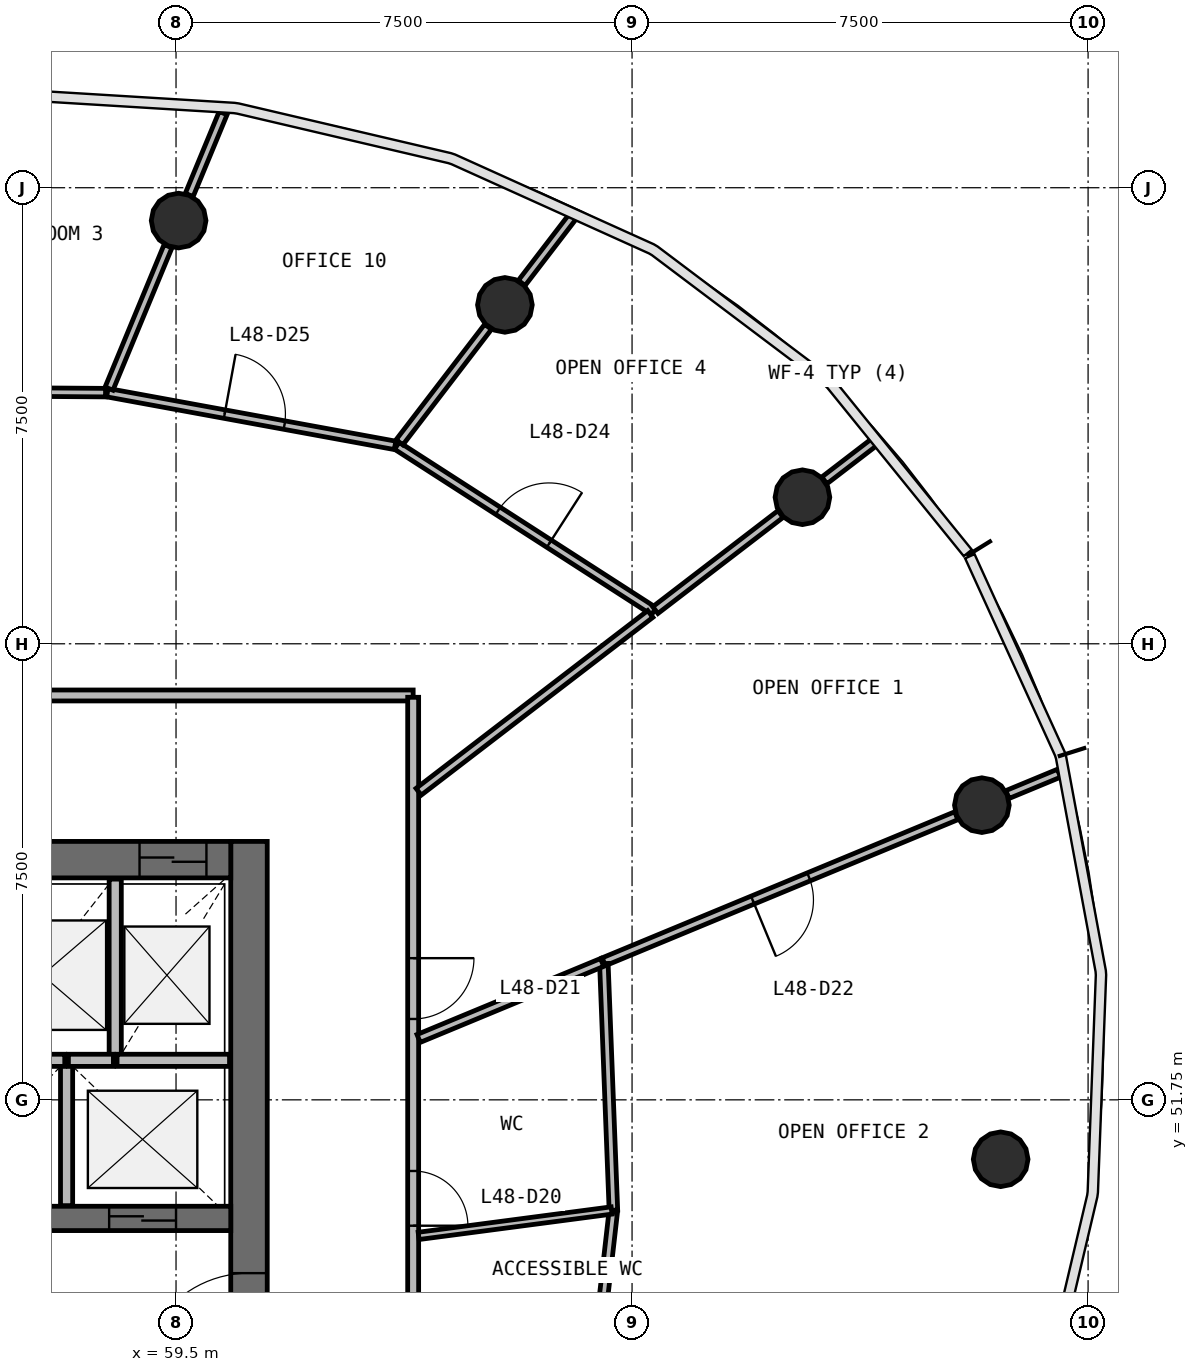
"""IFC4 building model, lengths in metres.
Left out: names, types, materials, properties, quantities, classifications, styles, units other than length and angle.
Written with IfcOpenShell. Run it as: python <this file> out.ifc"""

import sys

from ifc_helpers import new_model, si_unit, direction, frame, frame_2d, origin, origin_2d, place, context, subcontext, project, spatial, rectangle, circle, extrude, source, transform, mapped, element, fill, save


model = new_model("IFC4")
c1 = context("Model", 3, precision=1e-05, world=origin(), true_north=direction((0.0, 1.0)))
c2 = subcontext(c1, "Body", "Model", "MODEL_VIEW")
j1 = project(units=[si_unit("LENGTHUNIT", "METRE"), si_unit("PLANEANGLEUNIT", "RADIAN")], contexts=[c1])
p1 = place(None, origin())
s1 = spatial("IfcSite", under=j1, at=p1, CompositionType="ELEMENT")
p2 = place(p1, origin())
s2 = spatial("IfcBuilding", under=s1, at=p2, CompositionType="ELEMENT")
p3 = place(p2, frame((0.0, 0.0, 199.4)))
s3 = spatial("IfcBuildingStorey", under=s2, at=p3, CompositionType="ELEMENT", Elevation=199.4)
p4 = place(p3, frame((60.7, 40.0, 0.0), z_axis=(0.0, 0.0, 1.0), x_axis=(0.0, 1.0, 0.0)))
e1 = element("IfcWall", 1, at=p4, inside=s3, PredefinedType="SHEAR", context=c2, shape_type="SweptSolid", body=[
    extrude(rectangle(XDim=16.0, YDim=0.6, at=frame_2d((8.0, 0.0))), origin(), (0.0, 0.0, 1.0), 3.9),
])
p5 = place(p4, frame((7.1, 0.0, 0.0)))
e2 = element("IfcOpeningElement", 2, at=p5, cuts=e1, PredefinedType="OPENING", context=c2, shape_type="SweptSolid", body=[
    extrude(rectangle(XDim=1.8, YDim=2.1, at=frame_2d((0.9, 1.05))), frame((0.0, 0.31, 0.0), z_axis=(0.0, -1.0, 0.0), x_axis=(1.0, 0.0, 0.0)), (0.0, 0.0, 1.0), 0.62),
])
p6 = place(p3, frame((60.4, 55.7, 0.0), z_axis=(0.0, 0.0, 1.0), x_axis=(-1.0, 0.0, 0.0)))
e3 = element("IfcWall", 3, at=p6, inside=s3, PredefinedType="SHEAR", context=c2, shape_type="SweptSolid", body=[
    extrude(rectangle(XDim=16.8, YDim=0.6, at=frame_2d((8.4, 0.0))), origin(), (0.0, 0.0, 1.0), 3.9),
])
p7 = place(p6, frame((0.4, 0.0, 0.0)))
e4 = element("IfcOpeningElement", 4, at=p7, cuts=e3, PredefinedType="OPENING", context=c2, shape_type="SweptSolid", body=[
    extrude(rectangle(XDim=1.1, YDim=2.1, at=frame_2d((0.55, 1.05))), frame((0.0, 0.31, 0.0), z_axis=(0.0, -1.0, 0.0), x_axis=(1.0, 0.0, 0.0)), (0.0, 0.0, 1.0), 0.62),
])
p8 = place(p6, frame((10.3, 0.0, 0.0)))
e5 = element("IfcOpeningElement", 5, at=p8, cuts=e3, PredefinedType="OPENING", context=c2, shape_type="SweptSolid", body=[
    extrude(rectangle(XDim=1.2, YDim=2.1, at=frame_2d((0.6, 1.05))), frame((0.0, 0.31, 0.0), z_axis=(0.0, -1.0, 0.0), x_axis=(1.0, 0.0, 0.0)), (0.0, 0.0, 1.0), 0.62),
])
p9 = place(p6, frame((7.25, 0.0, 0.0)))
e6 = element("IfcOpeningElement", 6, at=p9, cuts=e3, PredefinedType="OPENING", context=c2, shape_type="SweptSolid", body=[
    extrude(rectangle(XDim=1.1, YDim=2.1, at=frame_2d((0.55, 1.05))), frame((0.0, 0.31, 0.0), z_axis=(0.0, -1.0, 0.0), x_axis=(1.0, 0.0, 0.0)), (0.0, 0.0, 1.0), 0.62),
])
p10 = place(p3, frame((43.6, 49.8, 0.0), z_axis=(0.0, 0.0, 1.0), x_axis=(1.0, 0.0, 0.0)))
e7 = element("IfcWall", 7, at=p10, inside=s3, PredefinedType="SHEAR", context=c2, shape_type="SweptSolid", body=[
    extrude(rectangle(XDim=16.8, YDim=0.4, at=frame_2d((8.4, 0.0))), origin(), (0.0, 0.0, 1.0), 3.9),
])
p11 = place(p10, frame((9.8, 0.0, 0.0)))
e8 = element("IfcOpeningElement", 8, at=p11, cuts=e7, PredefinedType="OPENING", context=c2, shape_type="SweptSolid", body=[
    extrude(rectangle(XDim=1.1, YDim=2.1, at=frame_2d((0.55, 1.05))), frame((0.0, 0.21, 0.0), z_axis=(0.0, -1.0, 0.0), x_axis=(1.0, 0.0, 0.0)), (0.0, 0.0, 1.0), 0.42),
])
p12 = place(p10, frame((12.3, 0.0, 0.0)))
e9 = element("IfcOpeningElement", 9, at=p12, cuts=e7, PredefinedType="OPENING", context=c2, shape_type="SweptSolid", body=[
    extrude(rectangle(XDim=1.1, YDim=2.1, at=frame_2d((0.55, 1.05))), frame((0.0, 0.21, 0.0), z_axis=(0.0, -1.0, 0.0), x_axis=(1.0, 0.0, 0.0)), (0.0, 0.0, 1.0), 0.42),
])
p13 = place(p10, frame((14.8, 0.0, 0.0)))
e10 = element("IfcOpeningElement", 10, at=p13, cuts=e7, PredefinedType="OPENING", context=c2, shape_type="SweptSolid", body=[
    extrude(rectangle(XDim=1.1, YDim=2.1, at=frame_2d((0.55, 1.05))), frame((0.0, 0.21, 0.0), z_axis=(0.0, -1.0, 0.0), x_axis=(1.0, 0.0, 0.0)), (0.0, 0.0, 1.0), 0.42),
])
p14 = place(p10, frame((4.45, 0.0, 0.0)))
e11 = element("IfcOpeningElement", 11, at=p14, cuts=e7, PredefinedType="OPENING", context=c2, shape_type="SweptSolid", body=[
    extrude(rectangle(XDim=0.9, YDim=2.1, at=frame_2d((0.45, 1.05))), frame((0.0, 0.21, 0.0), z_axis=(0.0, -1.0, 0.0), x_axis=(1.0, 0.0, 0.0)), (0.0, 0.0, 1.0), 0.42),
])
p15 = place(p10, frame((7.85, 0.0, 0.0)))
e12 = element("IfcOpeningElement", 12, at=p15, cuts=e7, PredefinedType="OPENING", context=c2, shape_type="SweptSolid", body=[
    extrude(rectangle(XDim=0.9, YDim=2.1, at=frame_2d((0.45, 1.05))), frame((0.0, 0.21, 0.0), z_axis=(0.0, -1.0, 0.0), x_axis=(1.0, 0.0, 0.0)), (0.0, 0.0, 1.0), 0.42),
])
m1 = source(origin(), c2, "Body", "SweptSolid", [
    extrude(circle(Radius=0.45, at=origin_2d()), origin(), (0.0, 0.0, 1.0), 3.9),
])
for number, where, z_axis, x_axis in (
    (13, (73.062, 50.773, 0.0), (0.0, 0.0, 1.0), (1.0, 0.0, 0.0)),
    (14, (72.753, 56.596, 0.0), (0.0, 0.0, 1.0), (1.0, 0.0, 0.0)),
    (15, (69.802, 61.66, 0.0), (0.0, 0.0, 1.0), (1.0, 0.0, 0.0)),
    (16, (64.909, 64.823, 0.0), (0.0, 0.0, 1.0), (1.0, 0.0, 0.0)),
    (17, (59.543, 66.21, 0.0), (0.0, 0.0, 1.0), (1.0, 0.0, 0.0)),
):
    element("IfcColumn", number, at=place(p3, frame(where, z_axis=z_axis, x_axis=x_axis)), inside=s3, PredefinedType="COLUMN", context=c2, shape_type="MappedRepresentation", body=[
        mapped(m1, transform((0.0, 0.0, 0.0), scale=1.0)),
    ])
p16 = place(p3, frame((58.5, 52.4, 0.0), z_axis=(0.0, 0.0, 1.0), x_axis=(0.0, 1.0, 0.0)))
e18 = element("IfcWall", 18, at=p16, inside=s3, PredefinedType="SOLIDWALL", context=c2, shape_type="SweptSolid", body=[
    extrude(rectangle(XDim=2.98, YDim=0.2, at=frame_2d((1.49, 0.0))), origin(), (0.0, 0.0, 1.0), 3.58),
])
p17 = place(p3, frame((57.7, 50.01, 0.0), z_axis=(0.0, 0.0, 1.0), x_axis=(0.0, 1.0, 0.0)))
e19 = element("IfcWall", 19, at=p17, inside=s3, PredefinedType="SOLIDWALL", context=c2, shape_type="SweptSolid", body=[
    extrude(rectangle(XDim=2.39, YDim=0.2, at=frame_2d((1.195, 0.0))), origin(), (0.0, 0.0, 1.0), 3.58),
])
p18 = place(p3, frame((60.38, 52.4, 0.0), z_axis=(0.0, 0.0, 1.0), x_axis=(-1.0, 0.0, 0.0)))
e20 = element("IfcWall", 20, at=p18, inside=s3, PredefinedType="SOLIDWALL", context=c2, shape_type="SweptSolid", body=[
    extrude(rectangle(XDim=1.85, YDim=0.2, at=frame_2d((0.925, 0.0))), origin(), (0.0, 0.0, 1.0), 3.58),
])
p19 = place(p3, frame((57.67, 52.4, 0.0), z_axis=(0.0, 0.0, 1.0), x_axis=(-1.0, 0.0, 0.0)))
e21 = element("IfcWall", 21, at=p19, inside=s3, PredefinedType="SOLIDWALL", context=c2, shape_type="SweptSolid", body=[
    extrude(rectangle(XDim=1.54, YDim=0.2, at=frame_2d((0.77, 0.0))), origin(), (0.0, 0.0, 1.0), 3.58),
])
p20 = place(p3, frame((58.47, 52.4, 0.0), z_axis=(0.0, 0.0, 1.0), x_axis=(-1.0, 0.0, 0.0)))
e22 = element("IfcWall", 22, at=p20, inside=s3, PredefinedType="SOLIDWALL", context=c2, shape_type="SweptSolid", body=[
    extrude(rectangle(XDim=0.74, YDim=0.2, at=frame_2d((0.37, 0.0))), origin(), (0.0, 0.0, 1.0), 3.58),
])
p21 = place(p3, frame((40.6, 58.4, 0.0), z_axis=(0.0, 0.0, 1.0), x_axis=(1.0, 0.0, 0.0)))
e23 = element("IfcWall", 23, at=p21, inside=s3, PredefinedType="PARTITIONING", context=c2, shape_type="SweptSolid", body=[
    extrude(rectangle(XDim=22.8, YDim=0.18, at=frame_2d((11.4, 0.0))), origin(), (0.0, 0.0, 1.0), 2.88),
])
p22 = place(p21, frame((10.95, 0.0, 0.0)))
e24 = element("IfcOpeningElement", 24, at=p22, cuts=e23, PredefinedType="OPENING", context=c2, shape_type="SweptSolid", body=[
    extrude(rectangle(XDim=1.0, YDim=2.1, at=frame_2d((0.5, 1.05))), frame((0.0, 0.1, 0.0), z_axis=(0.0, -1.0, 0.0), x_axis=(1.0, 0.0, 0.0)), (0.0, 0.0, 1.0), 0.2),
])
p23 = place(p21, frame((8.75, 0.0, 0.0)))
e25 = element("IfcOpeningElement", 25, at=p23, cuts=e23, PredefinedType="OPENING", context=c2, shape_type="SweptSolid", body=[
    extrude(rectangle(XDim=1.0, YDim=2.1, at=frame_2d((0.5, 1.05))), frame((0.0, 0.1, 0.0), z_axis=(0.0, -1.0, 0.0), x_axis=(1.0, 0.0, 0.0)), (0.0, 0.0, 1.0), 0.2),
])
p24 = place(p3, frame((63.4, 58.37, 0.0), z_axis=(0.0, 0.0, 1.0), x_axis=(0.0, -1.0, 0.0)))
e26 = element("IfcWall", 26, at=p24, inside=s3, PredefinedType="PARTITIONING", context=c2, shape_type="SweptSolid", body=[
    extrude(rectangle(XDim=20.74, YDim=0.18, at=frame_2d((10.37, 0.0))), origin(), (0.0, 0.0, 1.0), 2.88),
])
p25 = place(p24, frame((9.99, 0.0, 0.0)))
e27 = element("IfcOpeningElement", 27, at=p25, cuts=e26, PredefinedType="OPENING", context=c2, shape_type="SweptSolid", body=[
    extrude(rectangle(XDim=0.9, YDim=2.1, at=frame_2d((0.45, 1.05))), frame((0.0, 0.1, 0.0), z_axis=(0.0, -1.0, 0.0), x_axis=(1.0, 0.0, 0.0)), (0.0, 0.0, 1.0), 0.2),
])
p26 = place(p24, frame((7.79, 0.0, 0.0)))
e28 = element("IfcOpeningElement", 28, at=p26, cuts=e26, PredefinedType="OPENING", context=c2, shape_type="SweptSolid", body=[
    extrude(rectangle(XDim=0.9, YDim=2.1, at=frame_2d((0.45, 1.05))), frame((0.0, 0.1, 0.0), z_axis=(0.0, -1.0, 0.0), x_axis=(1.0, 0.0, 0.0)), (0.0, 0.0, 1.0), 0.2),
])
p27 = place(p24, frame((4.29, 0.0, 0.0)))
e29 = element("IfcOpeningElement", 29, at=p27, cuts=e26, PredefinedType="OPENING", context=c2, shape_type="SweptSolid", body=[
    extrude(rectangle(XDim=1.0, YDim=2.1, at=frame_2d((0.5, 1.05))), frame((0.0, 0.1, 0.0), z_axis=(0.0, -1.0, 0.0), x_axis=(1.0, 0.0, 0.0)), (0.0, 0.0, 1.0), 0.2),
])
p28 = place(p24, frame((12.09, 0.0, 0.0)))
e30 = element("IfcOpeningElement", 30, at=p28, cuts=e26, PredefinedType="OPENING", context=c2, shape_type="SweptSolid", body=[
    extrude(rectangle(XDim=1.0, YDim=2.1, at=frame_2d((0.5, 1.05))), frame((0.0, 0.1, 0.0), z_axis=(0.0, -1.0, 0.0), x_axis=(1.0, 0.0, 0.0)), (0.0, 0.0, 1.0), 0.2),
])
p29 = place(p3, frame((72.333, 56.422, 0.0), z_axis=(0.0, 0.0, 1.0), x_axis=(-0.92388406428, -0.382672491525, 0.0)))
e31 = element("IfcWall", 31, at=p29, inside=s3, PredefinedType="PARTITIONING", context=c2, shape_type="SweptSolid", body=[
    extrude(rectangle(XDim=6.275, YDim=0.14, at=frame_2d((3.138, 0.0))), origin(), (0.0, 0.0, 1.0), 2.88),
])
p30 = place(p29, frame((2.625, 0.0, 0.0)))
e32 = element("IfcOpeningElement", 32, at=p30, cuts=e31, PredefinedType="OPENING", context=c2, shape_type="SweptSolid", body=[
    extrude(rectangle(XDim=1.0, YDim=2.1, at=frame_2d((0.5, 1.05))), frame((0.0, 0.08, 0.0), z_axis=(0.0, -1.0, 0.0), x_axis=(1.0, 0.0, 0.0)), (0.0, 0.0, 1.0), 0.16),
])
p31 = place(p3, frame((63.132, 62.508, 0.0), z_axis=(0.0, 0.0, 1.0), x_axis=(0.840745911146, -0.541429878092, 0.0)))
e33 = element("IfcWall", 33, at=p31, inside=s3, PredefinedType="PARTITIONING", context=c2, shape_type="SweptSolid", body=[
    extrude(rectangle(XDim=5.028, YDim=0.14, at=frame_2d((2.514, 0.0))), origin(), (0.0, 0.0, 1.0), 2.88),
])
p32 = place(p31, frame((1.978, 0.0, 0.0)))
e34 = element("IfcOpeningElement", 34, at=p32, cuts=e33, PredefinedType="OPENING", context=c2, shape_type="SweptSolid", body=[
    extrude(rectangle(XDim=1.0, YDim=2.1, at=frame_2d((0.5, 1.05))), frame((0.0, 0.08, 0.0), z_axis=(0.0, -1.0, 0.0), x_axis=(1.0, 0.0, 0.0)), (0.0, 0.0, 1.0), 0.16),
])
p33 = place(p3, frame((63.49, 56.817, 0.0), z_axis=(0.0, 0.0, 1.0), x_axis=(0.793351007213, 0.608764469523, 0.0)))
e35 = element("IfcWall", 35, at=p33, inside=s3, PredefinedType="PARTITIONING", context=c2, shape_type="SweptSolid", body=[
    extrude(rectangle(XDim=4.802, YDim=0.14, at=frame_2d((2.401, 0.0))), origin(), (0.0, 0.0, 1.0), 2.88),
])
p34 = place(p3, frame((58.371, 63.38, 0.0), z_axis=(0.0, 0.0, 1.0), x_axis=(0.983627854142, -0.180211665982, 0.0)))
e36 = element("IfcWall", 36, at=p34, inside=s3, PredefinedType="PARTITIONING", context=c2, shape_type="SweptSolid", body=[
    extrude(rectangle(XDim=4.811, YDim=0.14, at=frame_2d((2.405, 0.0))), origin(), (0.0, 0.0, 1.0), 2.88),
])
p35 = place(p34, frame((1.961, 0.0, 0.0)))
e37 = element("IfcOpeningElement", 37, at=p35, cuts=e36, PredefinedType="OPENING", context=c2, shape_type="SweptSolid", body=[
    extrude(rectangle(XDim=1.0, YDim=2.1, at=frame_2d((0.5, 1.05))), frame((0.0, 0.08, 0.0), z_axis=(0.0, -1.0, 0.0), x_axis=(1.0, 0.0, 0.0)), (0.0, 0.0, 1.0), 0.16),
])
p36 = place(p3, frame((54.029, 63.41, 0.0), z_axis=(0.0, 0.0, 1.0), x_axis=(0.999976141478, -0.006907711299, 0.0)))
e38 = element("IfcWall", 38, at=p36, inside=s3, PredefinedType="PARTITIONING", context=c2, shape_type="SweptSolid", body=[
    extrude(rectangle(XDim=4.312, YDim=0.14, at=frame_2d((2.156, 0.0))), origin(), (0.0, 0.0, 1.0), 2.88),
])
p37 = place(p36, frame((1.662, 0.0, 0.0)))
e39 = element("IfcOpeningElement", 39, at=p37, cuts=e38, PredefinedType="OPENING", context=c2, shape_type="SweptSolid", body=[
    extrude(rectangle(XDim=1.0, YDim=2.1, at=frame_2d((0.5, 1.05))), frame((0.0, 0.08, 0.0), z_axis=(0.0, -1.0, 0.0), x_axis=(1.0, 0.0, 0.0)), (0.0, 0.0, 1.0), 0.16),
])
p38 = place(p3, frame((66.693, 49.934, 0.0), z_axis=(0.0, 0.0, 1.0), x_axis=(-0.038671022185, 0.999251996267, 0.0)))
e40 = element("IfcWall", 40, at=p38, inside=s3, PredefinedType="PARTITIONING", context=c2, shape_type="SweptSolid", body=[
    extrude(rectangle(XDim=4.059, YDim=0.14, at=frame_2d((2.03, 0.0))), origin(), (0.0, 0.0, 1.0), 2.88),
])
p39 = place(p3, frame((66.26, 46.123, 0.0), z_axis=(0.0, 0.0, 1.0), x_axis=(0.112951423427, 0.993600511245, 0.0)))
e41 = element("IfcWall", 41, at=p39, inside=s3, PredefinedType="PARTITIONING", context=c2, shape_type="SweptSolid", body=[
    extrude(rectangle(XDim=3.806, YDim=0.14, at=frame_2d((1.903, 0.0))), origin(), (0.0, 0.0, 1.0), 2.88),
])
p40 = place(p3, frame((63.49, 52.759, 0.0), z_axis=(0.0, 0.0, 1.0), x_axis=(0.923871065891, 0.382703871955, 0.0)))
e42 = element("IfcWall", 42, at=p40, inside=s3, PredefinedType="PARTITIONING", context=c2, shape_type="SweptSolid", body=[
    extrude(rectangle(XDim=3.266, YDim=0.14, at=frame_2d((1.633, 0.0))), origin(), (0.0, 0.0, 1.0), 2.88),
])
p41 = place(p3, frame((67.383, 59.804, 0.0), z_axis=(0.0, 0.0, 1.0), x_axis=(0.793357937247, 0.608755438092, 0.0)))
e43 = element("IfcWall", 43, at=p41, inside=s3, PredefinedType="PARTITIONING", context=c2, shape_type="SweptSolid", body=[
    extrude(rectangle(XDim=2.595, YDim=0.14, at=frame_2d((1.297, 0.0))), origin(), (0.0, 0.0, 1.0), 2.88),
])
p42 = place(p3, frame((58.398, 63.446, 0.0), z_axis=(0.0, 0.0, 1.0), x_axis=(0.382748544054, 0.923852559679, 0.0)))
e44 = element("IfcWall", 44, at=p42, inside=s3, PredefinedType="PARTITIONING", context=c2, shape_type="SweptSolid", body=[
    extrude(rectangle(XDim=2.536, YDim=0.14, at=frame_2d((1.268, 0.0))), origin(), (0.0, 0.0, 1.0), 2.88),
])
p43 = place(p3, frame((63.175, 62.563, 0.0), z_axis=(0.0, 0.0, 1.0), x_axis=(0.608759077064, 0.793355144996, 0.0)))
e45 = element("IfcWall", 45, at=p43, inside=s3, PredefinedType="PARTITIONING", context=c2, shape_type="SweptSolid", body=[
    extrude(rectangle(XDim=2.394, YDim=0.14, at=frame_2d((1.197, 0.0))), origin(), (0.0, 0.0, 1.0), 2.88),
])
p44 = place(p3, frame((59.717, 66.63, 0.0), z_axis=(0.0, 0.0, 1.0), x_axis=(0.382652525483, 0.923892333955, 0.0)))
e46 = element("IfcWall", 46, at=p44, inside=s3, PredefinedType="PARTITIONING", context=c2, shape_type="SweptSolid", body=[
    extrude(rectangle(XDim=1.458, YDim=0.14, at=frame_2d((0.729, 0.0))), origin(), (0.0, 0.0, 1.0), 2.88),
])
p45 = place(p3, frame((65.186, 65.184, 0.0), z_axis=(0.0, 0.0, 1.0), x_axis=(0.608686646562, 0.793410717281, 0.0)))
e47 = element("IfcWall", 47, at=p45, inside=s3, PredefinedType="PARTITIONING", context=c2, shape_type="SweptSolid", body=[
    extrude(rectangle(XDim=1.406, YDim=0.14, at=frame_2d((0.703, 0.0))), origin(), (0.0, 0.0, 1.0), 2.88),
])
p46 = place(p3, frame((70.163, 61.937, 0.0), z_axis=(0.0, 0.0, 1.0), x_axis=(0.793452471415, 0.608632217029, 0.0)))
e48 = element("IfcWall", 48, at=p46, inside=s3, PredefinedType="PARTITIONING", context=c2, shape_type="SweptSolid", body=[
    extrude(rectangle(XDim=1.073, YDim=0.14, at=frame_2d((0.536, 0.0))), origin(), (0.0, 0.0, 1.0), 2.88),
])
p47 = place(p3, frame((73.174, 56.77, 0.0), z_axis=(0.0, 0.0, 1.0), x_axis=(0.923854619105, 0.382743573112, 0.0)))
e49 = element("IfcWall", 49, at=p47, inside=s3, PredefinedType="PARTITIONING", context=c2, shape_type="SweptSolid", body=[
    extrude(rectangle(XDim=0.917, YDim=0.14, at=frame_2d((0.458, 0.0))), origin(), (0.0, 0.0, 1.0), 2.88),
])
p48 = place(p3, frame((63.49, 49.513, 0.0), z_axis=(0.0, 0.0, 1.0), x_axis=(0.991448323654, 0.130499890897, 0.0)))
e50 = element("IfcWall", 50, at=p48, inside=s3, PredefinedType="PARTITIONING", context=c2, shape_type="SweptSolid", body=[
    extrude(rectangle(XDim=3.201, YDim=0.12, at=frame_2d((1.601, 0.0))), origin(), (0.0, 0.0, 1.0), 2.88),
])
m2 = source(origin(), c2, "Body", "SweptSolid", [
    extrude(rectangle(XDim=1.8, YDim=2.1, at=frame_2d((0.9, 1.05))), frame((0.0, 0.025, 0.0), z_axis=(0.0, -1.0, 0.0), x_axis=(1.0, 0.0, 0.0)), (0.0, 0.0, 1.0), 0.05),
])
p49 = place(p5, origin())
e51 = element("IfcDoor", 51, at=p49, inside=s3, OperationType="SINGLE_SWING_LEFT", PredefinedType="DOOR", context=c2, shape_type="MappedRepresentation", body=[
    mapped(m2, transform((0.0, 0.0, 0.0), scale=1.0)),
])
fill(e2, e51)
m3 = source(origin(), c2, "Body", "SweptSolid", [
    extrude(rectangle(XDim=1.1, YDim=2.1, at=frame_2d((0.55, 1.05))), frame((0.0, 0.025, 0.0), z_axis=(0.0, -1.0, 0.0), x_axis=(1.0, 0.0, 0.0)), (0.0, 0.0, 1.0), 0.05),
])
p50 = place(p13, origin())
e52 = element("IfcDoor", 52, at=p50, inside=s3, OperationType="DOUBLE_DOOR_SLIDING", PredefinedType="USERDEFINED", context=c2, shape_type="MappedRepresentation", body=[
    mapped(m3, transform((0.0, 0.0, 0.0), scale=1.0)),
])
fill(e10, e52)
p51 = place(p7, origin())
e53 = element("IfcDoor", 53, at=p51, inside=s3, OperationType="DOUBLE_DOOR_SLIDING", PredefinedType="USERDEFINED", context=c2, shape_type="MappedRepresentation", body=[
    mapped(m3, transform((0.0, 0.0, 0.0), scale=1.0)),
])
fill(e4, e53)
m4 = source(origin(), c2, "Body", "SweptSolid", [
    extrude(rectangle(XDim=0.9, YDim=2.1, at=frame_2d((0.45, 1.05))), frame((0.0, 0.025, 0.0), z_axis=(0.0, -1.0, 0.0), x_axis=(1.0, 0.0, 0.0)), (0.0, 0.0, 1.0), 0.05),
])
p52 = place(p26, origin())
e54 = element("IfcDoor", 54, at=p52, inside=s3, OperationType="SINGLE_SWING_RIGHT", PredefinedType="DOOR", context=c2, shape_type="MappedRepresentation", body=[
    mapped(m4, transform((0.0, 0.0, 0.0), scale=1.0)),
])
fill(e28, e54)
m5 = source(origin(), c2, "Body", "SweptSolid", [
    extrude(rectangle(XDim=1.0, YDim=2.1, at=frame_2d((0.5, 1.05))), frame((0.0, 0.025, 0.0), z_axis=(0.0, -1.0, 0.0), x_axis=(1.0, 0.0, 0.0)), (0.0, 0.0, 1.0), 0.05),
])
p53 = place(p27, origin())
e55 = element("IfcDoor", 55, at=p53, inside=s3, OperationType="SINGLE_SWING_LEFT", PredefinedType="DOOR", context=c2, shape_type="MappedRepresentation", body=[
    mapped(m5, transform((0.0, 0.0, 0.0), scale=1.0)),
])
fill(e29, e55)
p54 = place(p30, origin())
e56 = element("IfcDoor", 56, at=p54, inside=s3, OperationType="SINGLE_SWING_RIGHT", PredefinedType="DOOR", context=c2, shape_type="MappedRepresentation", body=[
    mapped(m5, transform((0.0, 0.0, 0.0), scale=1.0)),
])
fill(e32, e56)
p55 = place(p32, origin())
e57 = element("IfcDoor", 57, at=p55, inside=s3, OperationType="SINGLE_SWING_RIGHT", PredefinedType="DOOR", context=c2, shape_type="MappedRepresentation", body=[
    mapped(m5, transform((0.0, 0.0, 0.0), scale=1.0)),
])
fill(e34, e57)
p56 = place(p35, origin())
e58 = element("IfcDoor", 58, at=p56, inside=s3, OperationType="SINGLE_SWING_LEFT", PredefinedType="DOOR", context=c2, shape_type="MappedRepresentation", body=[
    mapped(m5, transform((0.0, 0.0, 0.0), scale=1.0)),
])
fill(e37, e58)
save(model, sys.argv[1])
